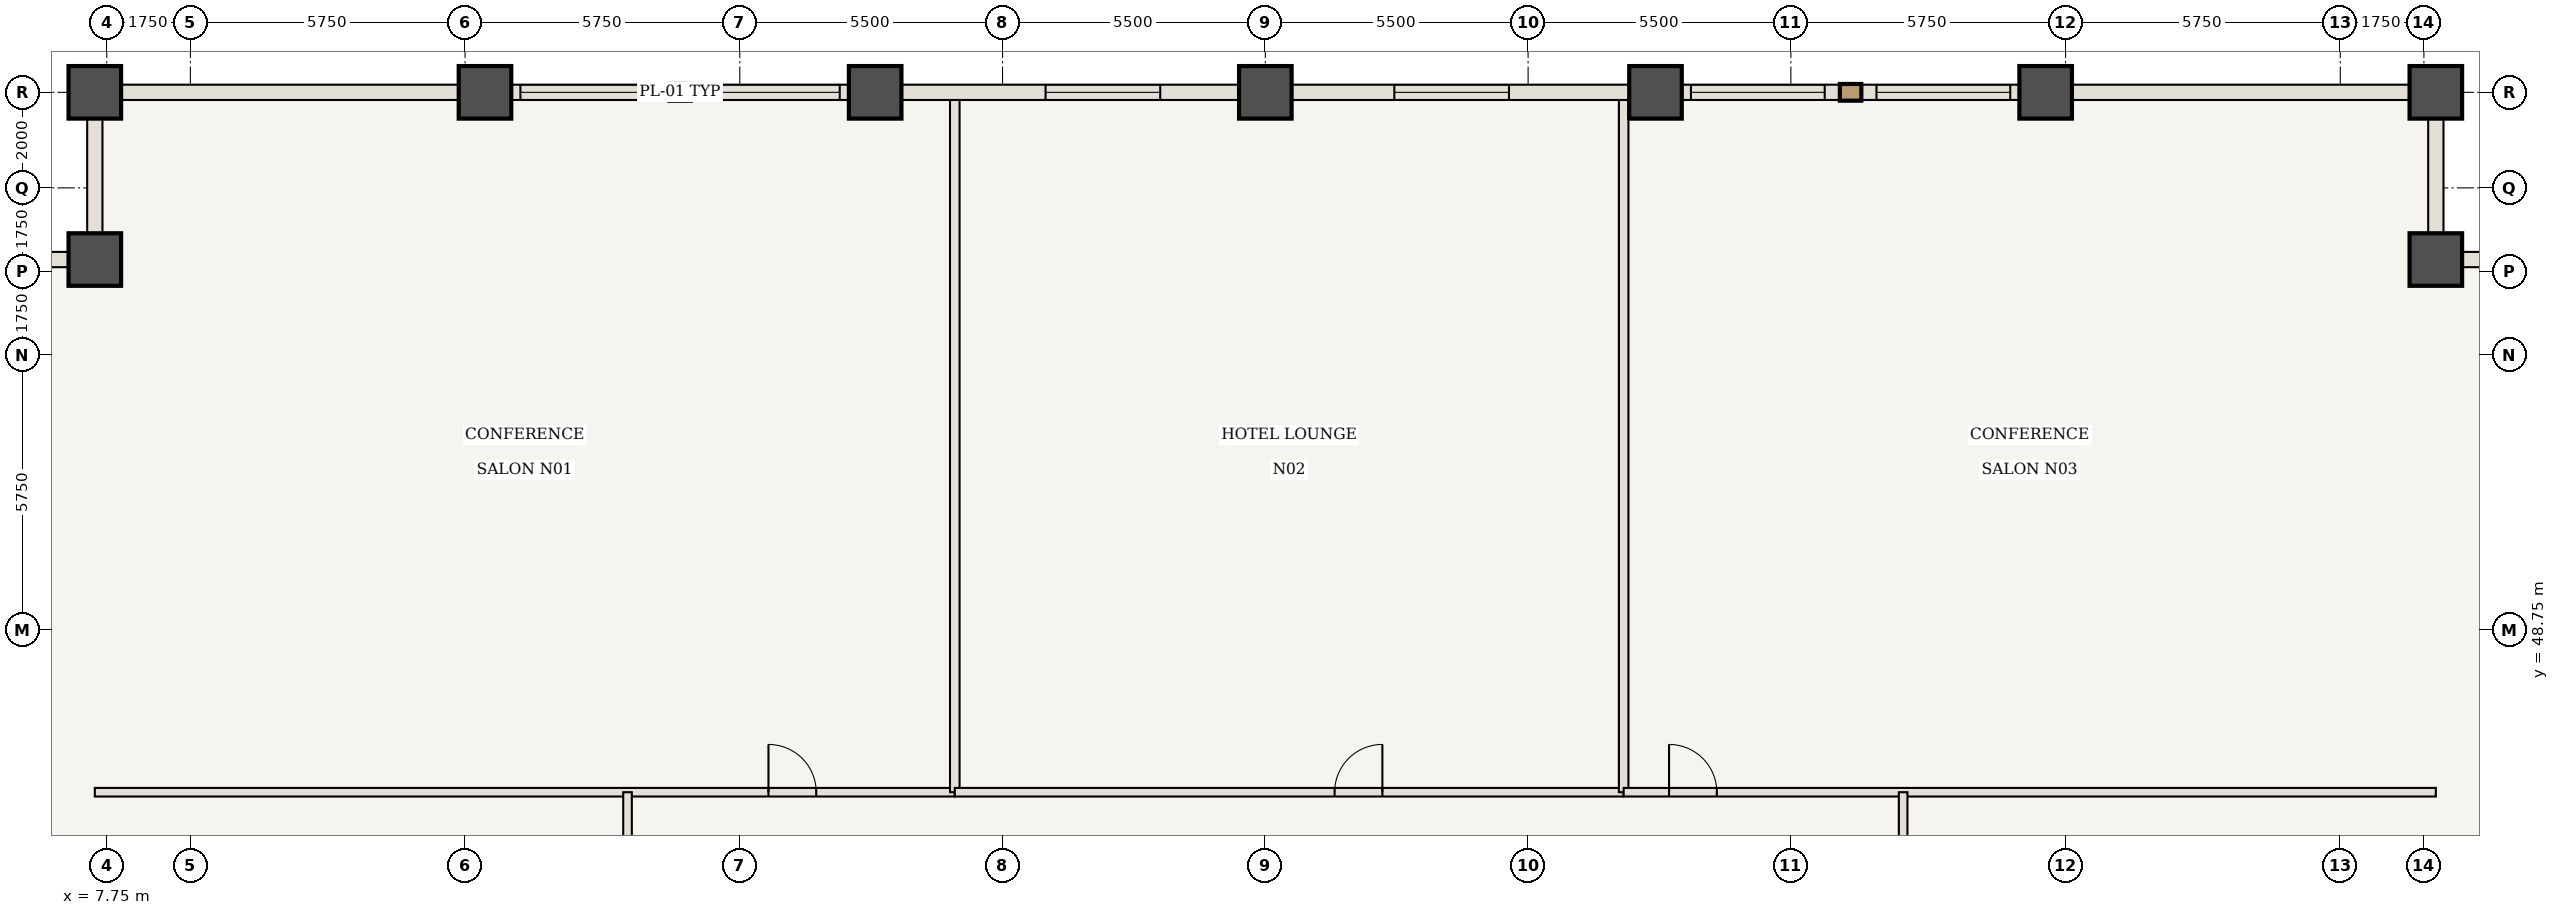
"""IFC4 building model, lengths in metres.
Left out: names, types, materials, properties, quantities, classifications, styles, units other than length and angle.
Written with IfcOpenShell. Run it as: python <this file> out.ifc"""

import sys

from ifc_helpers import new_model, si_unit, direction, frame, frame_2d, origin, origin_2d, place, context, subcontext, project, spatial, rectangle, extrude, element, fill, save


model = new_model("IFC4")
c1 = context("Model", 3, precision=1e-05, world=origin(), true_north=direction((0.0, 1.0)))
c2 = subcontext(c1, "Body", "Model", "MODEL_VIEW")
j1 = project(units=[si_unit("LENGTHUNIT", "METRE"), si_unit("PLANEANGLEUNIT", "RADIAN")], contexts=[c1])
p1 = place(None, origin())
s1 = spatial("IfcSite", under=j1, at=p1, CompositionType="ELEMENT")
p2 = place(p1, origin())
s2 = spatial("IfcBuilding", under=s1, at=p2, CompositionType="ELEMENT")
p3 = place(p2, frame((0.0, 0.0, 63.35)))
s3 = spatial("IfcBuildingStorey", under=s2, at=p3, CompositionType="ELEMENT", Elevation=63.35)
for number, where, z_axis, x_axis in (
    (1, (56.5, 56.5, 0.0), (0.0, 0.0, 1.0), (1.0, 0.0, 0.0)),
    (2, (56.5, 60.0, 0.0), (0.0, 0.0, 1.0), (1.0, 0.0, 0.0)),
    (3, (7.5, 60.0, 0.0), (0.0, 0.0, 1.0), (1.0, 0.0, 0.0)),
    (4, (7.5, 56.5, 0.0), (0.0, 0.0, 1.0), (1.0, 0.0, 0.0)),
    (5, (15.667, 60.0, 0.0), (0.0, 0.0, 1.0), (1.0, 0.0, 0.0)),
    (6, (23.833, 60.0, 0.0), (0.0, 0.0, 1.0), (1.0, 0.0, 0.0)),
    (7, (32.0, 60.0, 0.0), (0.0, 0.0, 1.0), (1.0, 0.0, 0.0)),
    (8, (40.167, 60.0, 0.0), (0.0, 0.0, 1.0), (1.0, 0.0, 0.0)),
    (9, (48.333, 60.0, 0.0), (0.0, 0.0, 1.0), (1.0, 0.0, 0.0)),
):
    element("IfcColumn", number, at=place(p3, frame(where, z_axis=z_axis, x_axis=x_axis)), inside=s3, PredefinedType="COLUMN", context=c2, shape_type="SweptSolid", body=[
        extrude(rectangle(XDim=1.1, YDim=1.1, at=origin_2d()), origin(), (0.0, 0.0, 1.0), 3.5),
    ])
p4 = place(p3, frame((7.5, 45.35, 0.0), z_axis=(0.0, 0.0, 1.0), x_axis=(1.0, 0.0, 0.0)))
e10 = element("IfcWall", 10, at=p4, inside=s3, PredefinedType="STANDARD", context=c2, shape_type="SweptSolid", body=[
    extrude(rectangle(XDim=18.0, YDim=0.18, at=frame_2d((9.0, 0.0))), origin(), (0.0, 0.0, 1.0), 3.32),
])
p5 = place(p4, frame((14.1, 0.0, 0.0)))
e11 = element("IfcOpeningElement", 11, at=p5, cuts=e10, PredefinedType="OPENING", context=c2, shape_type="SweptSolid", body=[
    extrude(rectangle(XDim=1.0, YDim=2.15, at=frame_2d((0.5, 1.075))), frame((0.0, 0.1, 0.0), z_axis=(0.0, -1.0, 0.0), x_axis=(1.0, 0.0, 0.0)), (0.0, 0.0, 1.0), 0.2),
])
p6 = place(p3, frame((25.5, 45.35, 0.0), z_axis=(0.0, 0.0, 1.0), x_axis=(0.0, 1.0, 0.0)))
e12 = element("IfcWall", 12, at=p6, inside=s3, PredefinedType="STANDARD", context=c2, shape_type="SweptSolid", body=[
    extrude(rectangle(XDim=14.59, YDim=0.2, at=frame_2d((7.295, 0.0))), origin(), (0.0, 0.0, 1.0), 3.32),
])
p7 = place(p3, frame((25.5, 45.35, 0.0), z_axis=(0.0, 0.0, 1.0), x_axis=(1.0, 0.0, 0.0)))
e13 = element("IfcWall", 13, at=p7, inside=s3, PredefinedType="STANDARD", context=c2, shape_type="SweptSolid", body=[
    extrude(rectangle(XDim=14.0, YDim=0.18, at=frame_2d((7.0, 0.0))), origin(), (0.0, 0.0, 1.0), 3.32),
])
p8 = place(p7, frame((7.95, 0.0, 0.0)))
e14 = element("IfcOpeningElement", 14, at=p8, cuts=e13, PredefinedType="OPENING", context=c2, shape_type="SweptSolid", body=[
    extrude(rectangle(XDim=1.0, YDim=2.15, at=frame_2d((0.5, 1.075))), frame((0.0, 0.1, 0.0), z_axis=(0.0, -1.0, 0.0), x_axis=(1.0, 0.0, 0.0)), (0.0, 0.0, 1.0), 0.2),
])
p9 = place(p3, frame((39.5, 45.35, 0.0), z_axis=(0.0, 0.0, 1.0), x_axis=(0.0, 1.0, 0.0)))
e15 = element("IfcWall", 15, at=p9, inside=s3, PredefinedType="STANDARD", context=c2, shape_type="SweptSolid", body=[
    extrude(rectangle(XDim=14.59, YDim=0.2, at=frame_2d((7.295, 0.0))), origin(), (0.0, 0.0, 1.0), 3.32),
])
p10 = place(p3, frame((39.5, 45.35, 0.0), z_axis=(0.0, 0.0, 1.0), x_axis=(1.0, 0.0, 0.0)))
e16 = element("IfcWall", 16, at=p10, inside=s3, PredefinedType="STANDARD", context=c2, shape_type="SweptSolid", body=[
    extrude(rectangle(XDim=17.0, YDim=0.18, at=frame_2d((8.5, 0.0))), origin(), (0.0, 0.0, 1.0), 3.32),
])
p11 = place(p10, frame((0.95, 0.0, 0.0)))
e17 = element("IfcOpeningElement", 17, at=p11, cuts=e16, PredefinedType="OPENING", context=c2, shape_type="SweptSolid", body=[
    extrude(rectangle(XDim=1.0, YDim=2.15, at=frame_2d((0.5, 1.075))), frame((0.0, 0.1, 0.0), z_axis=(0.0, -1.0, 0.0), x_axis=(1.0, 0.0, 0.0)), (0.0, 0.0, 1.0), 0.2),
])
p12 = place(p3, frame((18.65, 41.5, 0.0), z_axis=(0.0, 0.0, 1.0), x_axis=(0.0, 1.0, 0.0)))
e18 = element("IfcWall", 18, at=p12, inside=s3, PredefinedType="STANDARD", context=c2, shape_type="SweptSolid", body=[
    extrude(rectangle(XDim=3.85, YDim=0.18, at=frame_2d((1.925, 0.0))), origin(), (0.0, 0.0, 1.0), 3.32),
])
p13 = place(p12, frame((1.425, 0.0, 0.0)))
e19 = element("IfcOpeningElement", 19, at=p13, cuts=e18, PredefinedType="OPENING", context=c2, shape_type="SweptSolid", body=[
    extrude(rectangle(XDim=1.0, YDim=2.15, at=frame_2d((0.5, 1.075))), frame((0.0, 0.1, 0.0), z_axis=(0.0, -1.0, 0.0), x_axis=(1.0, 0.0, 0.0)), (0.0, 0.0, 1.0), 0.2),
])
p14 = place(p3, frame((45.35, 39.0, 0.0), z_axis=(0.0, 0.0, 1.0), x_axis=(0.0, 1.0, 0.0)))
e20 = element("IfcWall", 20, at=p14, inside=s3, PredefinedType="STANDARD", context=c2, shape_type="SweptSolid", body=[
    extrude(rectangle(XDim=6.35, YDim=0.18, at=frame_2d((3.175, 0.0))), origin(), (0.0, 0.0, 1.0), 3.32),
])
p15 = place(p14, frame((2.675, 0.0, 0.0)))
e21 = element("IfcOpeningElement", 21, at=p15, cuts=e20, PredefinedType="OPENING", context=c2, shape_type="SweptSolid", body=[
    extrude(rectangle(XDim=1.0, YDim=2.15, at=frame_2d((0.5, 1.075))), frame((0.0, 0.1, 0.0), z_axis=(0.0, -1.0, 0.0), x_axis=(1.0, 0.0, 0.0)), (0.0, 0.0, 1.0), 0.2),
])
p16 = place(p3, frame((7.5, 60.0, 0.0), z_axis=(0.0, 0.0, 1.0), x_axis=(1.0, 0.0, 0.0)))
e22 = element("IfcWall", 22, at=p16, inside=s3, PredefinedType="USERDEFINED", context=c2, shape_type="SweptSolid", body=[
    extrude(rectangle(XDim=8.167, YDim=0.32, at=frame_2d((4.083, 0.0))), origin(), (0.0, 0.0, 1.0), 2.52),
])
p17 = place(p3, frame((15.667, 60.0, 0.0), z_axis=(0.0, 0.0, 1.0), x_axis=(1.0, 0.0, 0.0)))
e23 = element("IfcWall", 23, at=p17, inside=s3, PredefinedType="USERDEFINED", context=c2, shape_type="SweptSolid", body=[
    extrude(rectangle(XDim=8.167, YDim=0.32, at=frame_2d((4.083, 0.0))), origin(), (0.0, 0.0, 1.0), 2.52),
])
p18 = place(p17, frame((0.742, 0.0, 0.85)))
e24 = element("IfcOpeningElement", 24, at=p18, cuts=e23, PredefinedType="OPENING", context=c2, shape_type="SweptSolid", body=[
    extrude(rectangle(XDim=2.8, YDim=1.47, at=frame_2d((1.4, 0.735))), frame((0.0, 0.17, 0.0), z_axis=(0.0, -1.0, 0.0), x_axis=(1.0, 0.0, 0.0)), (0.0, 0.0, 1.0), 0.34),
])
p19 = place(p17, frame((4.625, 0.0, 0.85)))
e25 = element("IfcOpeningElement", 25, at=p19, cuts=e23, PredefinedType="OPENING", context=c2, shape_type="SweptSolid", body=[
    extrude(rectangle(XDim=2.8, YDim=1.47, at=frame_2d((1.4, 0.735))), frame((0.0, 0.17, 0.0), z_axis=(0.0, -1.0, 0.0), x_axis=(1.0, 0.0, 0.0)), (0.0, 0.0, 1.0), 0.34),
])
p20 = place(p3, frame((23.833, 60.0, 0.0), z_axis=(0.0, 0.0, 1.0), x_axis=(1.0, 0.0, 0.0)))
e26 = element("IfcWall", 26, at=p20, inside=s3, PredefinedType="USERDEFINED", context=c2, shape_type="SweptSolid", body=[
    extrude(rectangle(XDim=8.167, YDim=0.32, at=frame_2d((4.083, 0.0))), origin(), (0.0, 0.0, 1.0), 2.52),
])
p21 = place(p20, frame((3.567, 0.0, 0.85)))
e27 = element("IfcOpeningElement", 27, at=p21, cuts=e26, PredefinedType="OPENING", context=c2, shape_type="SweptSolid", body=[
    extrude(rectangle(XDim=2.4, YDim=1.47, at=frame_2d((1.2, 0.735))), frame((0.0, 0.17, 0.0), z_axis=(0.0, -1.0, 0.0), x_axis=(1.0, 0.0, 0.0)), (0.0, 0.0, 1.0), 0.34),
])
p22 = place(p3, frame((32.0, 60.0, 0.0), z_axis=(0.0, 0.0, 1.0), x_axis=(1.0, 0.0, 0.0)))
e28 = element("IfcWall", 28, at=p22, inside=s3, PredefinedType="USERDEFINED", context=c2, shape_type="SweptSolid", body=[
    extrude(rectangle(XDim=8.167, YDim=0.32, at=frame_2d((4.083, 0.0))), origin(), (0.0, 0.0, 1.0), 2.52),
])
p23 = place(p22, frame((2.7, 0.0, 0.85)))
e29 = element("IfcOpeningElement", 29, at=p23, cuts=e28, PredefinedType="OPENING", context=c2, shape_type="SweptSolid", body=[
    extrude(rectangle(XDim=2.4, YDim=1.47, at=frame_2d((1.2, 0.735))), frame((0.0, 0.17, 0.0), z_axis=(0.0, -1.0, 0.0), x_axis=(1.0, 0.0, 0.0)), (0.0, 0.0, 1.0), 0.34),
])
p24 = place(p3, frame((40.167, 60.0, 0.0), z_axis=(0.0, 0.0, 1.0), x_axis=(1.0, 0.0, 0.0)))
e30 = element("IfcWall", 30, at=p24, inside=s3, PredefinedType="USERDEFINED", context=c2, shape_type="SweptSolid", body=[
    extrude(rectangle(XDim=8.167, YDim=0.32, at=frame_2d((4.083, 0.0))), origin(), (0.0, 0.0, 1.0), 2.52),
])
p25 = place(p24, frame((0.742, 0.0, 0.85)))
e31 = element("IfcOpeningElement", 31, at=p25, cuts=e30, PredefinedType="OPENING", context=c2, shape_type="SweptSolid", body=[
    extrude(rectangle(XDim=2.8, YDim=1.47, at=frame_2d((1.4, 0.735))), frame((0.0, 0.17, 0.0), z_axis=(0.0, -1.0, 0.0), x_axis=(1.0, 0.0, 0.0)), (0.0, 0.0, 1.0), 0.34),
])
p26 = place(p24, frame((4.625, 0.0, 0.85)))
e32 = element("IfcOpeningElement", 32, at=p26, cuts=e30, PredefinedType="OPENING", context=c2, shape_type="SweptSolid", body=[
    extrude(rectangle(XDim=2.8, YDim=1.47, at=frame_2d((1.4, 0.735))), frame((0.0, 0.17, 0.0), z_axis=(0.0, -1.0, 0.0), x_axis=(1.0, 0.0, 0.0)), (0.0, 0.0, 1.0), 0.34),
])
p27 = place(p3, frame((48.333, 60.0, 0.0), z_axis=(0.0, 0.0, 1.0), x_axis=(1.0, 0.0, 0.0)))
e33 = element("IfcWall", 33, at=p27, inside=s3, PredefinedType="USERDEFINED", context=c2, shape_type="SweptSolid", body=[
    extrude(rectangle(XDim=8.167, YDim=0.32, at=frame_2d((4.083, 0.0))), origin(), (0.0, 0.0, 1.0), 2.52),
])
for number, where, z_axis, x_axis in (
    (34, (56.5, 56.5, 0.0), (0.0, 0.0, 1.0), (1.0, 0.0, 0.0)),
    (35, (56.5, 60.0, 0.0), (0.0, 0.0, 1.0), (0.0, -1.0, 0.0)),
    (36, (7.5, 56.5, 0.0), (0.0, 0.0, 1.0), (0.0, 1.0, 0.0)),
    (37, (4.0, 56.5, 0.0), (0.0, 0.0, 1.0), (1.0, 0.0, 0.0)),
):
    element("IfcWall", number, at=place(p3, frame(where, z_axis=z_axis, x_axis=x_axis)), inside=s3, PredefinedType="USERDEFINED", context=c2, shape_type="SweptSolid", body=[
        extrude(rectangle(XDim=3.5, YDim=0.32, at=frame_2d((1.75, 0.0))), origin(), (0.0, 0.0, 1.0), 2.52),
    ])
p28 = place(p5, origin())
e38 = element("IfcDoor", 38, at=p28, inside=s3, OperationType="SINGLE_SWING_LEFT", PredefinedType="DOOR", context=c2, shape_type="SweptSolid", body=[
    extrude(rectangle(XDim=1.0, YDim=2.15, at=frame_2d((0.5, 1.075))), frame((0.0, 0.025, 0.0), z_axis=(0.0, -1.0, 0.0), x_axis=(1.0, 0.0, 0.0)), (0.0, 0.0, 1.0), 0.05),
])
fill(e11, e38)
p29 = place(p8, origin())
e39 = element("IfcDoor", 39, at=p29, inside=s3, OperationType="SINGLE_SWING_RIGHT", PredefinedType="DOOR", context=c2, shape_type="SweptSolid", body=[
    extrude(rectangle(XDim=1.0, YDim=2.15, at=frame_2d((0.5, 1.075))), frame((0.0, 0.025, 0.0), z_axis=(0.0, -1.0, 0.0), x_axis=(1.0, 0.0, 0.0)), (0.0, 0.0, 1.0), 0.05),
])
fill(e14, e39)
p30 = place(p11, origin())
e40 = element("IfcDoor", 40, at=p30, inside=s3, OperationType="SINGLE_SWING_LEFT", PredefinedType="DOOR", context=c2, shape_type="SweptSolid", body=[
    extrude(rectangle(XDim=1.0, YDim=2.15, at=frame_2d((0.5, 1.075))), frame((0.0, 0.025, 0.0), z_axis=(0.0, -1.0, 0.0), x_axis=(1.0, 0.0, 0.0)), (0.0, 0.0, 1.0), 0.05),
])
fill(e17, e40)
p31 = place(p18, origin())
e41 = element("IfcWindow", 41, at=p31, inside=s3, PartitioningType="SINGLE_PANEL", PredefinedType="WINDOW", context=c2, shape_type="SweptSolid", body=[
    extrude(rectangle(XDim=2.8, YDim=1.47, at=frame_2d((1.4, 0.735))), frame((0.0, 0.03, 0.0), z_axis=(0.0, -1.0, 0.0), x_axis=(1.0, 0.0, 0.0)), (0.0, 0.0, 1.0), 0.06),
])
fill(e24, e41)
p32 = place(p19, origin())
e42 = element("IfcWindow", 42, at=p32, inside=s3, PartitioningType="SINGLE_PANEL", PredefinedType="WINDOW", context=c2, shape_type="SweptSolid", body=[
    extrude(rectangle(XDim=2.8, YDim=1.47, at=frame_2d((1.4, 0.735))), frame((0.0, 0.03, 0.0), z_axis=(0.0, -1.0, 0.0), x_axis=(1.0, 0.0, 0.0)), (0.0, 0.0, 1.0), 0.06),
])
fill(e25, e42)
p33 = place(p21, origin())
e43 = element("IfcWindow", 43, at=p33, inside=s3, PartitioningType="SINGLE_PANEL", PredefinedType="WINDOW", context=c2, shape_type="SweptSolid", body=[
    extrude(rectangle(XDim=2.4, YDim=1.47, at=frame_2d((1.2, 0.735))), frame((0.0, 0.03, 0.0), z_axis=(0.0, -1.0, 0.0), x_axis=(1.0, 0.0, 0.0)), (0.0, 0.0, 1.0), 0.06),
])
fill(e27, e43)
p34 = place(p23, origin())
e44 = element("IfcWindow", 44, at=p34, inside=s3, PartitioningType="SINGLE_PANEL", PredefinedType="WINDOW", context=c2, shape_type="SweptSolid", body=[
    extrude(rectangle(XDim=2.4, YDim=1.47, at=frame_2d((1.2, 0.735))), frame((0.0, 0.03, 0.0), z_axis=(0.0, -1.0, 0.0), x_axis=(1.0, 0.0, 0.0)), (0.0, 0.0, 1.0), 0.06),
])
fill(e29, e44)
p35 = place(p25, origin())
e45 = element("IfcWindow", 45, at=p35, inside=s3, PartitioningType="SINGLE_PANEL", PredefinedType="WINDOW", context=c2, shape_type="SweptSolid", body=[
    extrude(rectangle(XDim=2.8, YDim=1.47, at=frame_2d((1.4, 0.735))), frame((0.0, 0.03, 0.0), z_axis=(0.0, -1.0, 0.0), x_axis=(1.0, 0.0, 0.0)), (0.0, 0.0, 1.0), 0.06),
])
fill(e31, e45)
p36 = place(p26, origin())
e46 = element("IfcWindow", 46, at=p36, inside=s3, PartitioningType="SINGLE_PANEL", PredefinedType="WINDOW", context=c2, shape_type="SweptSolid", body=[
    extrude(rectangle(XDim=2.8, YDim=1.47, at=frame_2d((1.4, 0.735))), frame((0.0, 0.03, 0.0), z_axis=(0.0, -1.0, 0.0), x_axis=(1.0, 0.0, 0.0)), (0.0, 0.0, 1.0), 0.06),
])
fill(e32, e46)
save(model, sys.argv[1])
